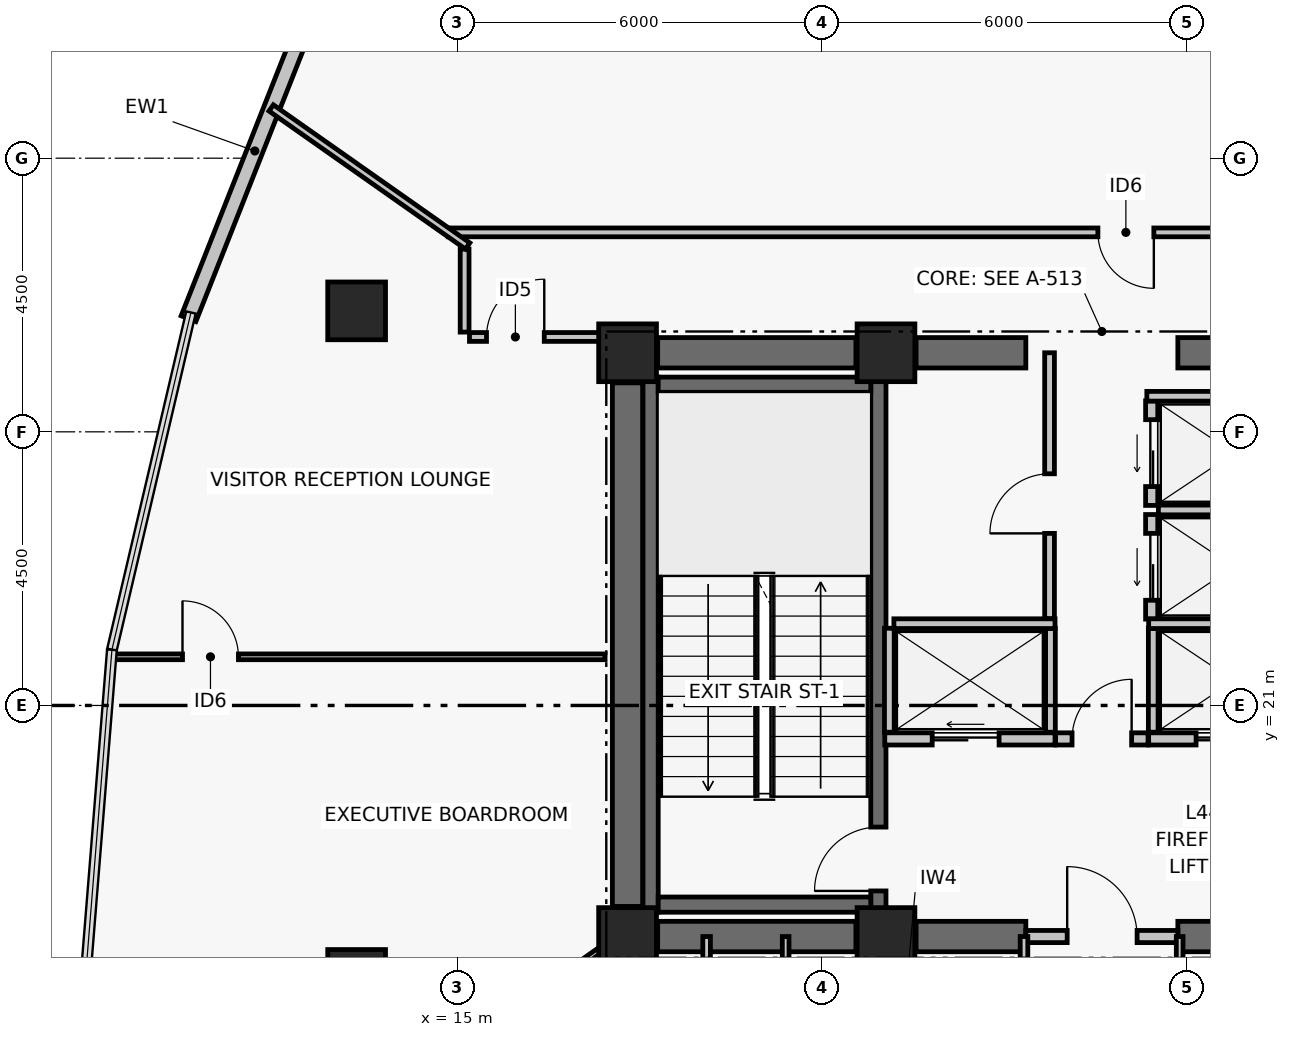
"""IFC4 building model, lengths in metres.
Left out: names, types, materials, properties, quantities, classifications, styles, units other than length and angle.
Written with IfcOpenShell. Run it as: python <this file> out.ifc"""

import sys

from ifc_helpers import new_model, si_unit, direction, frame, frame_2d, origin, origin_2d, place, context, subcontext, project, spatial, rectangle, hollow_rectangle, extrude, element, fill, save


model = new_model("IFC4")
c1 = context("Model", 3, precision=1e-05, world=origin(), true_north=direction((0.0, 1.0)))
c2 = subcontext(c1, "Body", "Model", "MODEL_VIEW")
j1 = project(units=[si_unit("LENGTHUNIT", "METRE"), si_unit("PLANEANGLEUNIT", "RADIAN")], contexts=[c1])
p1 = place(None, origin())
s1 = spatial("IfcSite", under=j1, at=p1, CompositionType="ELEMENT")
p2 = place(p1, origin())
s2 = spatial("IfcBuilding", under=s1, at=p2, CompositionType="ELEMENT")
p3 = place(p2, frame((0.0, 0.0, 176.64)))
s3 = spatial("IfcBuildingStorey", under=s2, at=p3, CompositionType="ELEMENT", Elevation=176.64)
for number, where, z_axis, x_axis in (
    (1, (17.8, 17.2, 0.0), (0.0, 0.0, 1.0), (1.0, 0.0, 0.0)),
    (2, (22.05, 17.2, 0.0), (0.0, 0.0, 1.0), (1.0, 0.0, 0.0)),
    (3, (17.8, 26.8, 0.0), (0.0, 0.0, 1.0), (1.0, 0.0, 0.0)),
    (4, (22.05, 26.8, 0.0), (0.0, 0.0, 1.0), (1.0, 0.0, 0.0)),
):
    element("IfcColumn", number, at=place(p3, frame(where, z_axis=z_axis, x_axis=x_axis)), inside=s3, PredefinedType="COLUMN", context=c2, shape_type="SweptSolid", body=[
        extrude(rectangle(XDim=0.95, YDim=0.95, at=origin_2d()), origin(), (0.0, 0.0, 1.0), 3.72),
    ])
p4 = place(p3, frame((18.295, 17.2, 0.0), z_axis=(0.0, 0.0, 1.0), x_axis=(1.0, 0.0, 0.0)))
e5 = element("IfcWall", 5, at=p4, inside=s3, PredefinedType="SHEAR", context=c2, shape_type="SweptSolid", body=[
    extrude(rectangle(XDim=3.26, YDim=0.5, at=frame_2d((1.63, 0.0))), origin(), (0.0, 0.0, 1.0), 3.5),
])
p5 = place(p3, frame((22.545, 17.2, 0.0), z_axis=(0.0, 0.0, 1.0), x_axis=(1.0, 0.0, 0.0)))
e6 = element("IfcWall", 6, at=p5, inside=s3, PredefinedType="SHEAR", context=c2, shape_type="SweptSolid", body=[
    extrude(rectangle(XDim=1.805, YDim=0.5, at=frame_2d((0.903, 0.0))), origin(), (0.0, 0.0, 1.0), 3.5),
])
p6 = place(p3, frame((26.85, 17.2, 0.0), z_axis=(0.0, 0.0, 1.0), x_axis=(1.0, 0.0, 0.0)))
e7 = element("IfcWall", 7, at=p6, inside=s3, PredefinedType="SHEAR", context=c2, shape_type="SweptSolid", body=[
    extrude(rectangle(XDim=1.805, YDim=0.5, at=frame_2d((0.902, 0.0))), origin(), (0.0, 0.0, 1.0), 3.5),
])
p7 = place(p3, frame((18.295, 26.8, 0.0), z_axis=(0.0, 0.0, 1.0), x_axis=(1.0, 0.0, 0.0)))
e8 = element("IfcWall", 8, at=p7, inside=s3, PredefinedType="SHEAR", context=c2, shape_type="SweptSolid", body=[
    extrude(rectangle(XDim=3.26, YDim=0.5, at=frame_2d((1.63, 0.0))), origin(), (0.0, 0.0, 1.0), 3.5),
])
p8 = place(p3, frame((22.545, 26.8, 0.0), z_axis=(0.0, 0.0, 1.0), x_axis=(1.0, 0.0, 0.0)))
e9 = element("IfcWall", 9, at=p8, inside=s3, PredefinedType="SHEAR", context=c2, shape_type="SweptSolid", body=[
    extrude(rectangle(XDim=1.805, YDim=0.5, at=frame_2d((0.903, 0.0))), origin(), (0.0, 0.0, 1.0), 3.5),
])
p9 = place(p3, frame((26.85, 26.8, 0.0), z_axis=(0.0, 0.0, 1.0), x_axis=(1.0, 0.0, 0.0)))
e10 = element("IfcWall", 10, at=p9, inside=s3, PredefinedType="SHEAR", context=c2, shape_type="SweptSolid", body=[
    extrude(rectangle(XDim=1.805, YDim=0.5, at=frame_2d((0.902, 0.0))), origin(), (0.0, 0.0, 1.0), 3.5),
])
p10 = place(p3, frame((17.8, 17.695, 0.0), z_axis=(0.0, 0.0, 1.0), x_axis=(0.0, 1.0, 0.0)))
e11 = element("IfcWall", 11, at=p10, inside=s3, PredefinedType="SHEAR", context=c2, shape_type="SweptSolid", body=[
    extrude(rectangle(XDim=8.61, YDim=0.5, at=frame_2d((4.305, 0.0))), origin(), (0.0, 0.0, 1.0), 3.5),
])
p11 = place(p3, frame((18.179, 17.6, 0.0), z_axis=(0.0, 0.0, 1.0), x_axis=(0.0, 1.0, 0.0)))
e12 = element("IfcWall", 12, at=p11, inside=s3, PredefinedType="SHEAR", context=c2, shape_type="SweptSolid", body=[
    extrude(rectangle(XDim=8.8, YDim=0.25, at=frame_2d((4.4, 0.0))), origin(), (0.0, 0.0, 1.0), 3.5),
])
p12 = place(p3, frame((21.925, 17.6, 0.0), z_axis=(0.0, 0.0, 1.0), x_axis=(0.0, 1.0, 0.0)))
e13 = element("IfcWall", 13, at=p12, inside=s3, PredefinedType="SHEAR", context=c2, shape_type="SweptSolid", body=[
    extrude(rectangle(XDim=8.8, YDim=0.25, at=frame_2d((4.4, 0.0))), origin(), (0.0, 0.0, 1.0), 3.5),
])
p13 = place(p12, frame((0.35, 0.0, 0.0)))
e14 = element("IfcOpeningElement", 14, at=p13, cuts=e13, PredefinedType="OPENING", context=c2, shape_type="SweptSolid", body=[
    extrude(rectangle(XDim=1.05, YDim=2.08, at=frame_2d((0.525, 1.04))), frame((0.0, 0.135, 0.0), z_axis=(0.0, -1.0, 0.0), x_axis=(1.0, 0.0, 0.0)), (0.0, 0.0, 1.0), 0.27),
])
for number, where, z_axis, x_axis in (
    (15, (18.304, 17.725, 0.0), (0.0, 0.0, 1.0), (1.0, 0.0, 0.0)),
    (16, (18.304, 26.275, 0.0), (0.0, 0.0, 1.0), (1.0, 0.0, 0.0)),
):
    element("IfcWall", number, at=place(p3, frame(where, z_axis=z_axis, x_axis=x_axis)), inside=s3, PredefinedType="SHEAR", context=c2, shape_type="SweptSolid", body=[
        extrude(rectangle(XDim=3.496, YDim=0.25, at=frame_2d((1.748, 0.0))), origin(), (0.0, 0.0, 1.0), 3.5),
    ])
for number, where, z_axis, x_axis in (
    (17, (13.344, 27.489, 0.0), (0.0, 0.0, 1.0), (1.0, 0.0, 0.0)),
    (18, (13.344, 16.511, 0.0), (0.0, 0.0, 1.0), (1.0, 0.0, 0.0)),
):
    element("IfcColumn", number, at=place(p3, frame(where, z_axis=z_axis, x_axis=x_axis)), inside=s3, PredefinedType="COLUMN", context=c2, shape_type="SweptSolid", body=[
        extrude(hollow_rectangle(XDim=0.95, YDim=0.95, WallThickness=0.04, at=origin_2d()), origin(), (0.0, 0.0, 1.0), 3.72),
    ])
p14 = place(p3, frame((10.579, 27.36, 0.0), z_axis=(0.0, 0.0, 1.0), x_axis=(0.367819433119, 0.929897233365, 0.0)))
e19 = element("IfcWall", 19, at=p14, inside=s3, PredefinedType="PARTITIONING", context=c2, shape_type="SweptSolid", body=[
    extrude(rectangle(XDim=5.933, YDim=0.26, at=frame_2d((2.967, 0.0))), origin(), (0.0, 0.0, 1.0), 3.5),
])
p15 = place(p3, frame((24.35, 17.2, 0.0), z_axis=(0.0, 0.0, 1.0), x_axis=(1.0, 0.0, 0.0)))
e20 = element("IfcWall", 20, at=p15, inside=s3, PredefinedType="PARTITIONING", context=c2, shape_type="SweptSolid", body=[
    extrude(rectangle(XDim=2.5, YDim=0.2, at=frame_2d((1.25, 0.0))), origin(), (0.0, 0.0, 1.0), 2.63),
])
p16 = place(p15, frame((0.68, 0.0, 0.0)))
e21 = element("IfcOpeningElement", 21, at=p16, cuts=e20, PredefinedType="OPENING", context=c2, shape_type="SweptSolid", body=[
    extrude(rectangle(XDim=1.15, YDim=2.08, at=frame_2d((0.575, 1.04))), frame((0.0, 0.11, 0.0), z_axis=(0.0, -1.0, 0.0), x_axis=(1.0, 0.0, 0.0)), (0.0, 0.0, 1.0), 0.22),
])
p17 = place(p3, frame((24.84, 20.45, 0.0), z_axis=(0.0, 0.0, 1.0), x_axis=(1.0, 0.0, 0.0)))
e22 = element("IfcWall", 22, at=p17, inside=s3, PredefinedType="PARTITIONING", context=c2, shape_type="SweptSolid", body=[
    extrude(rectangle(XDim=1.52, YDim=0.2, at=frame_2d((0.76, 0.0))), origin(), (0.0, 0.0, 1.0), 3.5),
])
p18 = place(p17, frame((0.27, 0.0, 0.0)))
e23 = element("IfcOpeningElement", 23, at=p18, cuts=e22, PredefinedType="OPENING", context=c2, shape_type="SweptSolid", body=[
    extrude(rectangle(XDim=0.98, YDim=2.06, at=frame_2d((0.49, 1.03))), frame((0.0, 0.11, 0.0), z_axis=(0.0, -1.0, 0.0), x_axis=(1.0, 0.0, 0.0)), (0.0, 0.0, 1.0), 0.22),
])
p19 = place(p3, frame((22.03, 20.45, 0.0), z_axis=(0.0, 0.0, 1.0), x_axis=(1.0, 0.0, 0.0)))
e24 = element("IfcWall", 24, at=p19, inside=s3, PredefinedType="PARTITIONING", context=c2, shape_type="SweptSolid", body=[
    extrude(rectangle(XDim=2.8, YDim=0.2, at=frame_2d((1.4, 0.0))), origin(), (0.0, 0.0, 1.0), 3.5),
])
p20 = place(p19, frame((0.78, 0.0, 0.0)))
e25 = element("IfcOpeningElement", 25, at=p20, cuts=e24, PredefinedType="OPENING", context=c2, shape_type="SweptSolid", body=[
    extrude(rectangle(XDim=1.1, YDim=2.08, at=frame_2d((0.55, 1.04))), frame((0.0, 0.11, 0.0), z_axis=(0.0, -1.0, 0.0), x_axis=(1.0, 0.0, 0.0)), (0.0, 0.0, 1.0), 0.22),
])
p21 = place(p3, frame((26.37, 20.45, 0.0), z_axis=(0.0, 0.0, 1.0), x_axis=(1.0, 0.0, 0.0)))
e26 = element("IfcWall", 26, at=p21, inside=s3, PredefinedType="PARTITIONING", context=c2, shape_type="SweptSolid", body=[
    extrude(rectangle(XDim=2.8, YDim=0.2, at=frame_2d((1.4, 0.0))), origin(), (0.0, 0.0, 1.0), 3.5),
])
p22 = place(p21, frame((0.78, 0.0, 0.0)))
e27 = element("IfcOpeningElement", 27, at=p22, cuts=e26, PredefinedType="OPENING", context=c2, shape_type="SweptSolid", body=[
    extrude(rectangle(XDim=1.1, YDim=2.08, at=frame_2d((0.55, 1.04))), frame((0.0, 0.11, 0.0), z_axis=(0.0, -1.0, 0.0), x_axis=(1.0, 0.0, 0.0)), (0.0, 0.0, 1.0), 0.22),
])
p23 = place(p3, frame((26.42, 22.42, 0.0), z_axis=(0.0, 0.0, 1.0), x_axis=(0.0, 1.0, 0.0)))
e28 = element("IfcWall", 28, at=p23, inside=s3, PredefinedType="PARTITIONING", context=c2, shape_type="SweptSolid", body=[
    extrude(rectangle(XDim=1.72, YDim=0.2, at=frame_2d((0.86, 0.0))), origin(), (0.0, 0.0, 1.0), 3.5),
])
p24 = place(p23, frame((0.31, 0.0, 0.0)))
e29 = element("IfcOpeningElement", 29, at=p24, cuts=e28, PredefinedType="OPENING", context=c2, shape_type="SweptSolid", body=[
    extrude(rectangle(XDim=1.1, YDim=2.08, at=frame_2d((0.55, 1.04))), frame((0.0, 0.11, 0.0), z_axis=(0.0, -1.0, 0.0), x_axis=(1.0, 0.0, 0.0)), (0.0, 0.0, 1.0), 0.22),
])
p25 = place(p3, frame((26.42, 24.29, 0.0), z_axis=(0.0, 0.0, 1.0), x_axis=(0.0, 1.0, 0.0)))
e30 = element("IfcWall", 30, at=p25, inside=s3, PredefinedType="PARTITIONING", context=c2, shape_type="SweptSolid", body=[
    extrude(rectangle(XDim=1.72, YDim=0.2, at=frame_2d((0.86, 0.0))), origin(), (0.0, 0.0, 1.0), 3.5),
])
p26 = place(p25, frame((0.31, 0.0, 0.0)))
e31 = element("IfcOpeningElement", 31, at=p26, cuts=e30, PredefinedType="OPENING", context=c2, shape_type="SweptSolid", body=[
    extrude(rectangle(XDim=1.1, YDim=2.08, at=frame_2d((0.55, 1.04))), frame((0.0, 0.11, 0.0), z_axis=(0.0, -1.0, 0.0), x_axis=(1.0, 0.0, 0.0)), (0.0, 0.0, 1.0), 0.22),
])
for number, where, z_axis, x_axis in (
    (32, (22.105, 20.56, 0.0), (0.0, 0.0, 1.0), (0.0, 1.0, 0.0)),
    (33, (24.755, 20.56, 0.0), (0.0, 0.0, 1.0), (0.0, 1.0, 0.0)),
):
    element("IfcWall", number, at=place(p3, frame(where, z_axis=z_axis, x_axis=x_axis)), inside=s3, PredefinedType="PARTITIONING", context=c2, shape_type="SweptSolid", body=[
        extrude(rectangle(XDim=1.71, YDim=0.16, at=frame_2d((0.855, 0.0))), origin(), (0.0, 0.0, 1.0), 3.5),
    ])
p27 = place(p3, frame((22.18, 22.345, 0.0), z_axis=(0.0, 0.0, 1.0), x_axis=(1.0, 0.0, 0.0)))
e34 = element("IfcWall", 34, at=p27, inside=s3, PredefinedType="PARTITIONING", context=c2, shape_type="SweptSolid", body=[
    extrude(rectangle(XDim=2.65, YDim=0.16, at=frame_2d((1.325, 0.0))), origin(), (0.0, 0.0, 1.0), 3.5),
])
p28 = place(p3, frame((26.445, 20.56, 0.0), z_axis=(0.0, 0.0, 1.0), x_axis=(0.0, 1.0, 0.0)))
e35 = element("IfcWall", 35, at=p28, inside=s3, PredefinedType="PARTITIONING", context=c2, shape_type="SweptSolid", body=[
    extrude(rectangle(XDim=1.71, YDim=0.16, at=frame_2d((0.855, 0.0))), origin(), (0.0, 0.0, 1.0), 3.5),
])
p29 = place(p3, frame((26.37, 22.345, 0.0), z_axis=(0.0, 0.0, 1.0), x_axis=(1.0, 0.0, 0.0)))
e36 = element("IfcWall", 36, at=p29, inside=s3, PredefinedType="PARTITIONING", context=c2, shape_type="SweptSolid", body=[
    extrude(rectangle(XDim=2.65, YDim=0.16, at=frame_2d((1.325, 0.0))), origin(), (0.0, 0.0, 1.0), 3.5),
])
p30 = place(p3, frame((26.53, 24.215, 0.0), z_axis=(0.0, 0.0, 1.0), x_axis=(1.0, 0.0, 0.0)))
e37 = element("IfcWall", 37, at=p30, inside=s3, PredefinedType="PARTITIONING", context=c2, shape_type="SweptSolid", body=[
    extrude(rectangle(XDim=2.49, YDim=0.16, at=frame_2d((1.245, 0.0))), origin(), (0.0, 0.0, 1.0), 3.5),
])
p31 = place(p3, frame((26.34, 26.085, 0.0), z_axis=(0.0, 0.0, 1.0), x_axis=(1.0, 0.0, 0.0)))
e38 = element("IfcWall", 38, at=p31, inside=s3, PredefinedType="PARTITIONING", context=c2, shape_type="SweptSolid", body=[
    extrude(rectangle(XDim=2.83, YDim=0.16, at=frame_2d((1.415, 0.0))), origin(), (0.0, 0.0, 1.0), 3.5),
])
p32 = place(p3, frame((24.74, 22.43, 0.0), z_axis=(0.0, 0.0, 1.0), x_axis=(0.0, 1.0, 0.0)))
e39 = element("IfcWall", 39, at=p32, inside=s3, PredefinedType="PARTITIONING", context=c2, shape_type="SweptSolid", body=[
    extrude(rectangle(XDim=4.37, YDim=0.16, at=frame_2d((2.185, 0.0))), origin(), (0.0, 0.0, 1.0), 2.63),
])
p33 = place(p32, frame((1.4, 0.0, 0.0)))
e40 = element("IfcOpeningElement", 40, at=p33, cuts=e39, PredefinedType="OPENING", context=c2, shape_type="SweptSolid", body=[
    extrude(rectangle(XDim=0.98, YDim=2.06, at=frame_2d((0.49, 1.03))), frame((0.0, 0.09, 0.0), z_axis=(0.0, -1.0, 0.0), x_axis=(1.0, 0.0, 0.0)), (0.0, 0.0, 1.0), 0.18),
])
p34 = place(p3, frame((19.1, 14.95, 0.0), z_axis=(0.0, 0.0, 1.0), x_axis=(0.0, 1.0, 0.0)))
e41 = element("IfcWall", 41, at=p34, inside=s3, PredefinedType="PARTITIONING", context=c2, shape_type="SweptSolid", body=[
    extrude(rectangle(XDim=2.25, YDim=0.125, at=frame_2d((1.125, 0.0))), origin(), (0.0, 0.0, 1.0), 2.63),
])
p35 = place(p3, frame((20.4, 14.95, 0.0), z_axis=(0.0, 0.0, 1.0), x_axis=(0.0, 1.0, 0.0)))
e42 = element("IfcWall", 42, at=p35, inside=s3, PredefinedType="PARTITIONING", context=c2, shape_type="SweptSolid", body=[
    extrude(rectangle(XDim=2.25, YDim=0.11, at=frame_2d((1.125, 0.0))), origin(), (0.0, 0.0, 1.0), 2.63),
])
for number, where, z_axis, x_axis in (
    (43, (22.36, 14.95, 0.0), (0.0, 0.0, 1.0), (0.0, 1.0, 0.0)),
    (44, (24.32, 14.95, 0.0), (0.0, 0.0, 1.0), (0.0, 1.0, 0.0)),
):
    element("IfcWall", number, at=place(p3, frame(where, z_axis=z_axis, x_axis=x_axis)), inside=s3, PredefinedType="PARTITIONING", context=c2, shape_type="SweptSolid", body=[
        extrude(rectangle(XDim=2.25, YDim=0.125, at=frame_2d((1.125, 0.0))), origin(), (0.0, 0.0, 1.0), 2.63),
    ])
p36 = place(p3, frame((26.88, 14.95, 0.0), z_axis=(0.0, 0.0, 1.0), x_axis=(0.0, 1.0, 0.0)))
e45 = element("IfcWall", 45, at=p36, inside=s3, PredefinedType="PARTITIONING", context=c2, shape_type="SweptSolid", body=[
    extrude(rectangle(XDim=2.25, YDim=0.11, at=frame_2d((1.125, 0.0))), origin(), (0.0, 0.0, 1.0), 2.63),
])
p37 = place(p3, frame((30.087, 28.78, 0.0), z_axis=(0.0, 0.0, 1.0), x_axis=(-1.0, 0.0, 0.0)))
e46 = element("IfcWall", 46, at=p37, inside=s3, PredefinedType="PARTITIONING", context=c2, shape_type="SweptSolid", body=[
    extrude(rectangle(XDim=15.236, YDim=0.145, at=frame_2d((7.618, 0.0))), origin(), (0.0, 0.0, 1.0), 2.73),
])
p38 = place(p37, frame((3.632, 0.0, 0.0)))
e47 = element("IfcOpeningElement", 47, at=p38, cuts=e46, PredefinedType="OPENING", context=c2, shape_type="SweptSolid", body=[
    extrude(rectangle(XDim=0.92, YDim=2.05, at=frame_2d((0.46, 1.025))), frame((0.0, 0.083, 0.0), z_axis=(0.0, -1.0, 0.0), x_axis=(1.0, 0.0, 0.0)), (0.0, 0.0, 1.0), 0.165),
])
p39 = place(p3, frame((15.12, 28.506, 0.0), z_axis=(0.0, 0.0, 1.0), x_axis=(0.0, -1.0, 0.0)))
e48 = element("IfcWall", 48, at=p39, inside=s3, PredefinedType="PARTITIONING", context=c2, shape_type="SweptSolid", body=[
    extrude(rectangle(XDim=1.366, YDim=0.145, at=frame_2d((0.683, 0.0))), origin(), (0.0, 0.0, 1.0), 2.73),
])
p40 = place(p3, frame((15.2, 27.06, 0.0), z_axis=(0.0, 0.0, 1.0), x_axis=(1.0, 0.0, 0.0)))
e49 = element("IfcWall", 49, at=p40, inside=s3, PredefinedType="PARTITIONING", context=c2, shape_type="SweptSolid", body=[
    extrude(rectangle(XDim=2.18, YDim=0.145, at=frame_2d((1.09, 0.0))), origin(), (0.0, 0.0, 1.0), 2.73),
])
p41 = place(p40, frame((0.28, 0.0, 0.0)))
e50 = element("IfcOpeningElement", 50, at=p41, cuts=e49, PredefinedType="OPENING", context=c2, shape_type="SweptSolid", body=[
    extrude(rectangle(XDim=0.95, YDim=2.06, at=frame_2d((0.475, 1.03))), frame((0.0, 0.083, 0.0), z_axis=(0.0, -1.0, 0.0), x_axis=(1.0, 0.0, 0.0)), (0.0, 0.0, 1.0), 0.165),
])
p42 = place(p3, frame((9.3, 21.8, 0.0), z_axis=(0.0, 0.0, 1.0), x_axis=(1.0, 0.0, 0.0)))
e51 = element("IfcWall", 51, at=p42, inside=s3, PredefinedType="PARTITIONING", context=c2, shape_type="SweptSolid", body=[
    extrude(rectangle(XDim=8.13, YDim=0.095, at=frame_2d((4.065, 0.0))), origin(), (0.0, 0.0, 1.0), 2.63),
])
p43 = place(p42, frame((1.18, 0.0, 0.0)))
e52 = element("IfcOpeningElement", 52, at=p43, cuts=e51, PredefinedType="OPENING", context=c2, shape_type="SweptSolid", body=[
    extrude(rectangle(XDim=0.92, YDim=2.05, at=frame_2d((0.46, 1.025))), frame((0.0, 0.057, 0.0), z_axis=(0.0, -1.0, 0.0), x_axis=(1.0, 0.0, 0.0)), (0.0, 0.0, 1.0), 0.115),
])
p44 = place(p3, frame((9.182, 11.236, 0.0), z_axis=(0.0, 0.0, 1.0), x_axis=(0.818184922636, 0.574955156835, 0.0)))
e53 = element("IfcWall", 53, at=p44, inside=s3, PredefinedType="PARTITIONING", context=c2, shape_type="SweptSolid", body=[
    extrude(rectangle(XDim=10.081, YDim=0.095, at=frame_2d((5.04, 0.0))), origin(), (0.0, 0.0, 1.0), 2.63),
])
p45 = place(p3, frame((11.939, 30.826, 0.0), z_axis=(0.0, 0.0, 1.0), x_axis=(0.81818776637, -0.574951110063, 0.0)))
e54 = element("IfcWall", 54, at=p45, inside=s3, PredefinedType="PARTITIONING", context=c2, shape_type="SweptSolid", body=[
    extrude(rectangle(XDim=3.949, YDim=0.125, at=frame_2d((1.974, 0.0))), origin(), (0.0, 0.0, 1.0), 2.93),
])
p46 = place(p13, origin())
e55 = element("IfcDoor", 55, at=p46, inside=s3, OperationType="SINGLE_SWING_LEFT", PredefinedType="DOOR", context=c2, shape_type="SweptSolid", body=[
    extrude(rectangle(XDim=1.05, YDim=2.08, at=frame_2d((0.525, 1.04))), frame((0.0, 0.025, 0.0), z_axis=(0.0, -1.0, 0.0), x_axis=(1.0, 0.0, 0.0)), (0.0, 0.0, 1.0), 0.05),
])
fill(e14, e55)
p47 = place(p16, origin())
e56 = element("IfcDoor", 56, at=p47, inside=s3, OperationType="SINGLE_SWING_LEFT", PredefinedType="DOOR", context=c2, shape_type="SweptSolid", body=[
    extrude(rectangle(XDim=1.15, YDim=2.08, at=frame_2d((0.575, 1.04))), frame((0.0, 0.025, 0.0), z_axis=(0.0, -1.0, 0.0), x_axis=(1.0, 0.0, 0.0)), (0.0, 0.0, 1.0), 0.05),
])
fill(e21, e56)
p48 = place(p18, origin())
e57 = element("IfcDoor", 57, at=p48, inside=s3, OperationType="SINGLE_SWING_RIGHT", PredefinedType="DOOR", context=c2, shape_type="SweptSolid", body=[
    extrude(rectangle(XDim=0.98, YDim=2.06, at=frame_2d((0.49, 1.03))), frame((0.0, 0.025, 0.0), z_axis=(0.0, -1.0, 0.0), x_axis=(1.0, 0.0, 0.0)), (0.0, 0.0, 1.0), 0.05),
])
fill(e23, e57)
p49 = place(p20, origin())
e58 = element("IfcDoor", 58, at=p49, inside=s3, OperationType="DOUBLE_DOOR_SLIDING", PredefinedType="DOOR", context=c2, shape_type="SweptSolid", body=[
    extrude(rectangle(XDim=1.1, YDim=2.08, at=frame_2d((0.55, 1.04))), frame((0.0, 0.025, 0.0), z_axis=(0.0, -1.0, 0.0), x_axis=(1.0, 0.0, 0.0)), (0.0, 0.0, 1.0), 0.05),
])
fill(e25, e58)
p50 = place(p22, origin())
e59 = element("IfcDoor", 59, at=p50, inside=s3, OperationType="DOUBLE_DOOR_SLIDING", PredefinedType="DOOR", context=c2, shape_type="SweptSolid", body=[
    extrude(rectangle(XDim=1.1, YDim=2.08, at=frame_2d((0.55, 1.04))), frame((0.0, 0.025, 0.0), z_axis=(0.0, -1.0, 0.0), x_axis=(1.0, 0.0, 0.0)), (0.0, 0.0, 1.0), 0.05),
])
fill(e27, e59)
p51 = place(p24, origin())
e60 = element("IfcDoor", 60, at=p51, inside=s3, OperationType="DOUBLE_DOOR_SLIDING", PredefinedType="DOOR", context=c2, shape_type="SweptSolid", body=[
    extrude(rectangle(XDim=1.1, YDim=2.08, at=frame_2d((0.55, 1.04))), frame((0.0, 0.025, 0.0), z_axis=(0.0, -1.0, 0.0), x_axis=(1.0, 0.0, 0.0)), (0.0, 0.0, 1.0), 0.05),
])
fill(e29, e60)
p52 = place(p26, origin())
e61 = element("IfcDoor", 61, at=p52, inside=s3, OperationType="DOUBLE_DOOR_SLIDING", PredefinedType="DOOR", context=c2, shape_type="SweptSolid", body=[
    extrude(rectangle(XDim=1.1, YDim=2.08, at=frame_2d((0.55, 1.04))), frame((0.0, 0.025, 0.0), z_axis=(0.0, -1.0, 0.0), x_axis=(1.0, 0.0, 0.0)), (0.0, 0.0, 1.0), 0.05),
])
fill(e31, e61)
p53 = place(p33, origin())
e62 = element("IfcDoor", 62, at=p53, inside=s3, OperationType="SINGLE_SWING_LEFT", PredefinedType="DOOR", context=c2, shape_type="SweptSolid", body=[
    extrude(rectangle(XDim=0.98, YDim=2.06, at=frame_2d((0.49, 1.03))), frame((0.0, 0.025, 0.0), z_axis=(0.0, -1.0, 0.0), x_axis=(1.0, 0.0, 0.0)), (0.0, 0.0, 1.0), 0.05),
])
fill(e40, e62)
p54 = place(p38, origin())
e63 = element("IfcDoor", 63, at=p54, inside=s3, OperationType="SINGLE_SWING_LEFT", PredefinedType="DOOR", context=c2, shape_type="SweptSolid", body=[
    extrude(rectangle(XDim=0.92, YDim=2.05, at=frame_2d((0.46, 1.025))), frame((0.0, 0.025, 0.0), z_axis=(0.0, -1.0, 0.0), x_axis=(1.0, 0.0, 0.0)), (0.0, 0.0, 1.0), 0.05),
])
fill(e47, e63)
p55 = place(p41, origin())
e64 = element("IfcDoor", 64, at=p55, inside=s3, OperationType="SINGLE_SWING_RIGHT", PredefinedType="DOOR", context=c2, shape_type="SweptSolid", body=[
    extrude(rectangle(XDim=0.95, YDim=2.06, at=frame_2d((0.475, 1.03))), frame((0.0, 0.025, 0.0), z_axis=(0.0, -1.0, 0.0), x_axis=(1.0, 0.0, 0.0)), (0.0, 0.0, 1.0), 0.05),
])
fill(e50, e64)
p56 = place(p43, origin())
e65 = element("IfcDoor", 65, at=p56, inside=s3, OperationType="SINGLE_SWING_LEFT", PredefinedType="DOOR", context=c2, shape_type="SweptSolid", body=[
    extrude(rectangle(XDim=0.92, YDim=2.05, at=frame_2d((0.46, 1.025))), frame((0.0, 0.025, 0.0), z_axis=(0.0, -1.0, 0.0), x_axis=(1.0, 0.0, 0.0)), (0.0, 0.0, 1.0), 0.05),
])
fill(e52, e65)
save(model, sys.argv[1])
